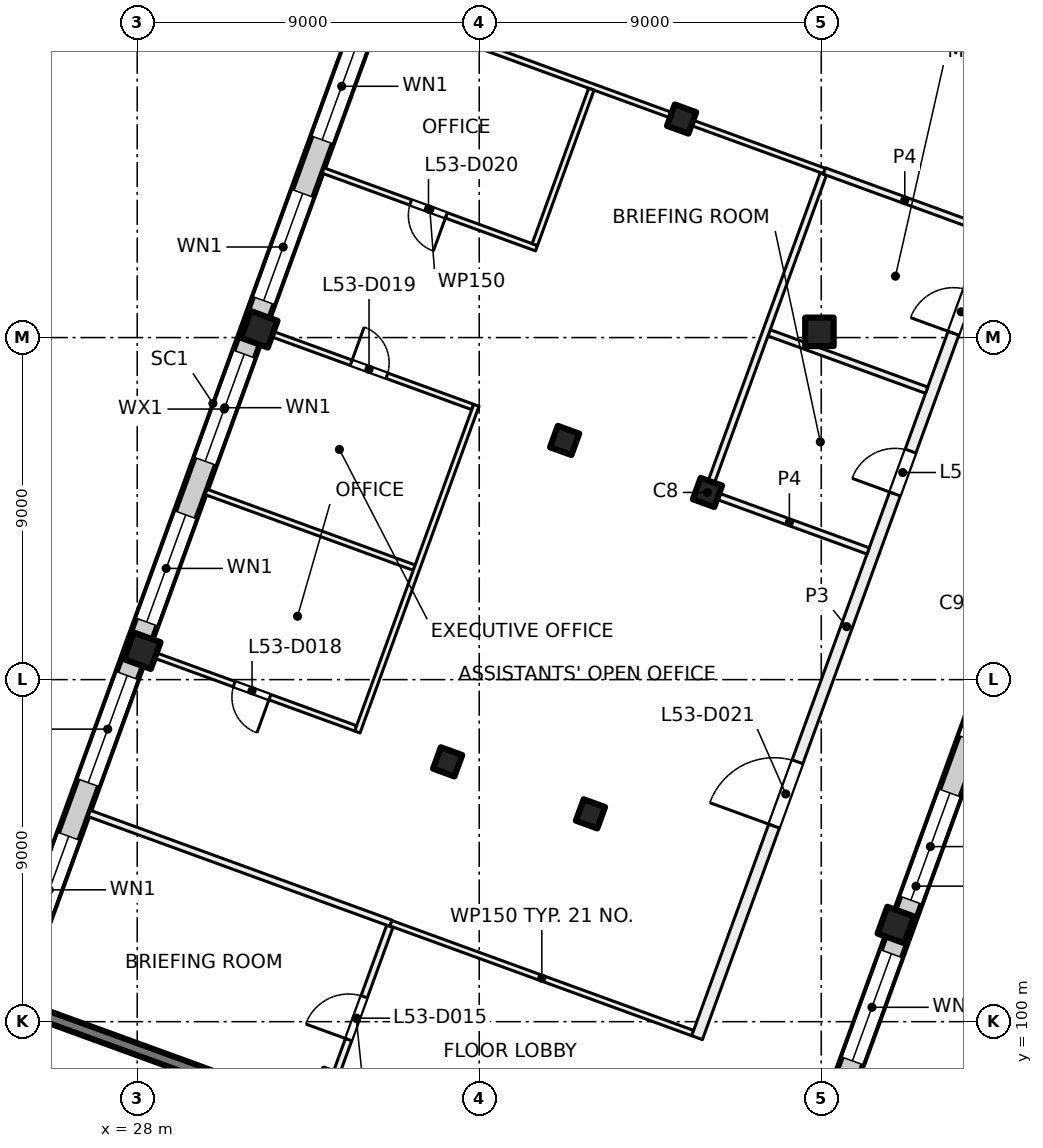
"""IFC4 building model, lengths in metres.
Left out: names, types, materials, properties, quantities, classifications, styles, units other than length and angle.
Written with IfcOpenShell. Run it as: python <this file> out.ifc"""

import sys

from ifc_helpers import new_model, si_unit, direction, frame, frame_2d, origin, origin_2d, place, context, subcontext, project, spatial, rectangle, extrude, element, fill, save


model = new_model("IFC4")
c1 = context("Model", 3, precision=1e-05, world=origin(), true_north=direction((0.0, 1.0)))
c2 = subcontext(c1, "Body", "Model", "MODEL_VIEW")
j1 = project(units=[si_unit("LENGTHUNIT", "METRE"), si_unit("PLANEANGLEUNIT", "RADIAN")], contexts=[c1])
p1 = place(None, origin())
s1 = spatial("IfcSite", under=j1, at=p1, CompositionType="ELEMENT")
p2 = place(p1, origin())
s2 = spatial("IfcBuilding", under=s1, at=p2, CompositionType="ELEMENT")
p3 = place(p2, frame((0.0, 0.0, 224.0)))
s3 = spatial("IfcBuildingStorey", under=s2, at=p3, CompositionType="ELEMENT", Elevation=224.0)
p4 = place(p3, frame((45.952, 118.152, 0.0), z_axis=(0.0, 0.0, 1.0), x_axis=(1.0, 0.0, 0.0)))
e1 = element("IfcColumn", 1, at=p4, inside=s3, PredefinedType="COLUMN", context=c2, shape_type="SweptSolid", body=[
    extrude(rectangle(XDim=0.75, YDim=0.75, at=origin_2d()), origin(), (0.0, 0.0, 1.0), 4.0),
])
for number, where, z_axis, x_axis in (
    (2, (43.006, 113.925, 0.0), (0.0, 0.0, 1.0), (-0.342, -0.94, 0.0)),
    (3, (39.927, 105.468, 0.0), (0.0, 0.0, 1.0), (-0.342, -0.94, 0.0)),
    (4, (42.325, 123.751, 0.0), (0.0, 0.0, 1.0), (-0.342, -0.94, 0.0)),
    (5, (39.247, 115.293, 0.0), (0.0, 0.0, 1.0), (-0.342, -0.94, 0.0)),
    (6, (36.169, 106.836, 0.0), (0.0, 0.0, 1.0), (-0.342, -0.94, 0.0)),
):
    element("IfcColumn", number, at=place(p3, frame(where, z_axis=z_axis, x_axis=x_axis)), inside=s3, PredefinedType="COLUMN", context=c2, shape_type="SweptSolid", body=[
        extrude(rectangle(XDim=0.6, YDim=0.6, at=origin_2d()), origin(), (0.0, 0.0, 1.0), 4.0),
    ])
for number, where, z_axis, x_axis in (
    (7, (47.962, 102.544, 0.0), (0.0, 0.0, 1.0), (-0.342, -0.94, 0.0)),
    (8, (31.212, 118.218, 0.0), (0.0, 0.0, 1.0), (-0.342, -0.94, 0.0)),
    (9, (28.134, 109.76, 0.0), (0.0, 0.0, 1.0), (-0.342, -0.94, 0.0)),
):
    element("IfcColumn", number, at=place(p3, frame(where, z_axis=z_axis, x_axis=x_axis)), inside=s3, PredefinedType="COLUMN", context=c2, shape_type="SweptSolid", body=[
        extrude(rectangle(XDim=0.75, YDim=0.75, at=origin_2d()), origin(), (0.0, 0.0, 1.0), 4.0),
    ])
p5 = place(p3, frame((32.971, 97.465, 0.0), z_axis=(0.0, 0.0, 1.0), x_axis=(-0.939695066972, 0.34201342241, 0.0)))
e10 = element("IfcWall", 10, at=p5, inside=s3, PredefinedType="SHEAR", context=c2, shape_type="SweptSolid", body=[
    extrude(rectangle(XDim=8.7, YDim=0.3, at=frame_2d((4.35, 0.0))), origin(), (0.0, 0.0, 1.0), 4.0),
])
p6 = place(p3, frame((52.212, 113.783, 0.0), z_axis=(0.0, 0.0, 1.0), x_axis=(-0.34202521188, -0.939690775968, 0.0)))
e11 = element("IfcWall", 11, at=p6, inside=s3, PredefinedType="SOLIDWALL", context=c2, shape_type="SweptSolid", body=[
    extrude(rectangle(XDim=21.745, YDim=0.6, at=frame_2d((10.873, 0.0))), origin(), (0.0, 0.0, 1.0), 3.625),
])
p7 = place(p6, frame((3.765, 0.0, 0.9)))
e12 = element("IfcOpeningElement", 12, at=p7, cuts=e11, PredefinedType="OPENING", context=c2, shape_type="SweptSolid", body=[
    extrude(rectangle(XDim=3.0, YDim=2.4, at=frame_2d((1.5, 1.2))), frame((0.0, 0.31, 0.0), z_axis=(0.0, -1.0, 0.0), x_axis=(1.0, 0.0, 0.0)), (0.0, 0.0, 1.0), 0.62),
])
p8 = place(p6, frame((8.265, 0.0, 0.9)))
e13 = element("IfcOpeningElement", 13, at=p8, cuts=e11, PredefinedType="OPENING", context=c2, shape_type="SweptSolid", body=[
    extrude(rectangle(XDim=3.0, YDim=2.4, at=frame_2d((1.5, 1.2))), frame((0.0, 0.31, 0.0), z_axis=(0.0, -1.0, 0.0), x_axis=(1.0, 0.0, 0.0)), (0.0, 0.0, 1.0), 0.62),
])
p9 = place(p6, frame((12.765, 0.0, 0.9)))
e14 = element("IfcOpeningElement", 14, at=p9, cuts=e11, PredefinedType="OPENING", context=c2, shape_type="SweptSolid", body=[
    extrude(rectangle(XDim=3.0, YDim=2.4, at=frame_2d((1.5, 1.2))), frame((0.0, 0.31, 0.0), z_axis=(0.0, -1.0, 0.0), x_axis=(1.0, 0.0, 0.0)), (0.0, 0.0, 1.0), 0.62),
])
p10 = place(p6, frame((17.265, 0.0, 0.9)))
e15 = element("IfcOpeningElement", 15, at=p10, cuts=e11, PredefinedType="OPENING", context=c2, shape_type="SweptSolid", body=[
    extrude(rectangle(XDim=3.0, YDim=2.4, at=frame_2d((1.5, 1.2))), frame((0.0, 0.31, 0.0), z_axis=(0.0, -1.0, 0.0), x_axis=(1.0, 0.0, 0.0)), (0.0, 0.0, 1.0), 0.62),
])
p11 = place(p3, frame((24.666, 100.669, 0.0), z_axis=(0.0, 0.0, 1.0), x_axis=(0.34201964167, 0.939692803373, 0.0)))
e16 = element("IfcWall", 16, at=p11, inside=s3, PredefinedType="SOLIDWALL", context=c2, shape_type="SweptSolid", body=[
    extrude(rectangle(XDim=32.884, YDim=0.6, at=frame_2d((16.442, 0.0))), origin(), (0.0, 0.0, 1.0), 3.625),
])
p12 = place(p11, frame((1.48, 0.0, 0.9)))
e17 = element("IfcOpeningElement", 17, at=p12, cuts=e16, PredefinedType="OPENING", context=c2, shape_type="SweptSolid", body=[
    extrude(rectangle(XDim=3.0, YDim=2.4, at=frame_2d((1.5, 1.2))), frame((0.0, 0.31, 0.0), z_axis=(0.0, -1.0, 0.0), x_axis=(1.0, 0.0, 0.0)), (0.0, 0.0, 1.0), 0.62),
])
p13 = place(p11, frame((5.98, 0.0, 0.9)))
e18 = element("IfcOpeningElement", 18, at=p13, cuts=e16, PredefinedType="OPENING", context=c2, shape_type="SweptSolid", body=[
    extrude(rectangle(XDim=3.0, YDim=2.4, at=frame_2d((1.5, 1.2))), frame((0.0, 0.31, 0.0), z_axis=(0.0, -1.0, 0.0), x_axis=(1.0, 0.0, 0.0)), (0.0, 0.0, 1.0), 0.62),
])
p14 = place(p11, frame((10.48, 0.0, 0.9)))
e19 = element("IfcOpeningElement", 19, at=p14, cuts=e16, PredefinedType="OPENING", context=c2, shape_type="SweptSolid", body=[
    extrude(rectangle(XDim=3.0, YDim=2.4, at=frame_2d((1.5, 1.2))), frame((0.0, 0.31, 0.0), z_axis=(0.0, -1.0, 0.0), x_axis=(1.0, 0.0, 0.0)), (0.0, 0.0, 1.0), 0.62),
])
p15 = place(p11, frame((14.98, 0.0, 0.9)))
e20 = element("IfcOpeningElement", 20, at=p15, cuts=e16, PredefinedType="OPENING", context=c2, shape_type="SweptSolid", body=[
    extrude(rectangle(XDim=3.0, YDim=2.4, at=frame_2d((1.5, 1.2))), frame((0.0, 0.31, 0.0), z_axis=(0.0, -1.0, 0.0), x_axis=(1.0, 0.0, 0.0)), (0.0, 0.0, 1.0), 0.62),
])
p16 = place(p11, frame((19.48, 0.0, 0.9)))
e21 = element("IfcOpeningElement", 21, at=p16, cuts=e16, PredefinedType="OPENING", context=c2, shape_type="SweptSolid", body=[
    extrude(rectangle(XDim=3.0, YDim=2.4, at=frame_2d((1.5, 1.2))), frame((0.0, 0.31, 0.0), z_axis=(0.0, -1.0, 0.0), x_axis=(1.0, 0.0, 0.0)), (0.0, 0.0, 1.0), 0.62),
])
p17 = place(p11, frame((23.98, 0.0, 0.9)))
e22 = element("IfcOpeningElement", 22, at=p17, cuts=e16, PredefinedType="OPENING", context=c2, shape_type="SweptSolid", body=[
    extrude(rectangle(XDim=3.0, YDim=2.4, at=frame_2d((1.5, 1.2))), frame((0.0, 0.31, 0.0), z_axis=(0.0, -1.0, 0.0), x_axis=(1.0, 0.0, 0.0)), (0.0, 0.0, 1.0), 0.62),
])
p18 = place(p11, frame((28.48, 0.0, 0.9)))
e23 = element("IfcOpeningElement", 23, at=p18, cuts=e16, PredefinedType="OPENING", context=c2, shape_type="SweptSolid", body=[
    extrude(rectangle(XDim=3.0, YDim=2.4, at=frame_2d((1.5, 1.2))), frame((0.0, 0.31, 0.0), z_axis=(0.0, -1.0, 0.0), x_axis=(1.0, 0.0, 0.0)), (0.0, 0.0, 1.0), 0.62),
])
p19 = place(p3, frame((26.736, 105.48, 0.0), z_axis=(0.0, 0.0, 1.0), x_axis=(0.939706509432, -0.341981982173, 0.0)))
e24 = element("IfcWall", 24, at=p19, inside=s3, PredefinedType="PARTITIONING", context=c2, shape_type="SweptSolid", body=[
    extrude(rectangle(XDim=8.45, YDim=0.175, at=frame_2d((4.225, 0.0))), origin(), (0.0, 0.0, 1.0), 3.625),
])
p20 = place(p3, frame((29.814, 113.938, 0.0), z_axis=(0.0, 0.0, 1.0), x_axis=(0.939738354986, -0.341894463495, 0.0)))
e25 = element("IfcWall", 25, at=p20, inside=s3, PredefinedType="PARTITIONING", context=c2, shape_type="SweptSolid", body=[
    extrude(rectangle(XDim=5.826, YDim=0.15, at=frame_2d((2.913, 0.0))), origin(), (0.0, 0.0, 1.0), 3.625),
])
p21 = place(p3, frame((31.353, 118.166, 0.0), z_axis=(0.0, 0.0, 1.0), x_axis=(0.939733456466, -0.341907927371, 0.0)))
e26 = element("IfcWall", 26, at=p21, inside=s3, PredefinedType="PARTITIONING", context=c2, shape_type="SweptSolid", body=[
    extrude(rectangle(XDim=5.826, YDim=0.15, at=frame_2d((2.913, 0.0))), origin(), (0.0, 0.0, 1.0), 3.625),
])
p22 = place(p21, frame((2.423, 0.0, 0.0)))
e27 = element("IfcOpeningElement", 27, at=p22, cuts=e26, PredefinedType="OPENING", context=c2, shape_type="SweptSolid", body=[
    extrude(rectangle(XDim=1.0, YDim=2.1, at=frame_2d((0.5, 1.05))), frame((0.0, 0.085, 0.0), z_axis=(0.0, -1.0, 0.0), x_axis=(1.0, 0.0, 0.0)), (0.0, 0.0, 1.0), 0.17),
])
p23 = place(p3, frame((33.749, 107.717, 0.0), z_axis=(0.0, 0.0, 1.0), x_axis=(-0.939718757431, 0.341948324943, 0.0)))
e28 = element("IfcWall", 28, at=p23, inside=s3, PredefinedType="PARTITIONING", context=c2, shape_type="SweptSolid", body=[
    extrude(rectangle(XDim=5.825, YDim=0.15, at=frame_2d((2.913, 0.0))), origin(), (0.0, 0.0, 1.0), 3.625),
])
p24 = place(p23, frame((2.403, 0.0, 0.0)))
e29 = element("IfcOpeningElement", 29, at=p24, cuts=e28, PredefinedType="OPENING", context=c2, shape_type="SweptSolid", body=[
    extrude(rectangle(XDim=1.0, YDim=2.1, at=frame_2d((0.5, 1.05))), frame((0.0, 0.085, 0.0), z_axis=(0.0, -1.0, 0.0), x_axis=(1.0, 0.0, 0.0)), (0.0, 0.0, 1.0), 0.17),
])
p25 = place(p3, frame((36.924, 116.218, 0.0), z_axis=(0.0, 0.0, 1.0), x_axis=(-0.342220796767, -0.939619564643, 0.0)))
e30 = element("IfcWall", 30, at=p25, inside=s3, PredefinedType="PARTITIONING", context=c2, shape_type="SweptSolid", body=[
    extrude(rectangle(XDim=9.149, YDim=0.15, at=frame_2d((4.575, 0.0))), origin(), (0.0, 0.0, 1.0), 3.625),
])
p26 = place(p3, frame((34.431, 126.624, 0.0), z_axis=(0.0, 0.0, 1.0), x_axis=(0.939703144457, -0.341991228392, 0.0)))
e31 = element("IfcWall", 31, at=p26, inside=s3, PredefinedType="PARTITIONING", context=c2, shape_type="SweptSolid", body=[
    extrude(rectangle(XDim=12.401, YDim=0.15, at=frame_2d((6.2, 0.0))), origin(), (0.0, 0.0, 1.0), 3.625),
])
p27 = place(p3, frame((32.881, 97.657, 0.0), z_axis=(0.0, 0.0, 1.0), x_axis=(0.342058204353, 0.939678766832, 0.0)))
e32 = element("IfcWall", 32, at=p27, inside=s3, PredefinedType="PARTITIONING", context=c2, shape_type="SweptSolid", body=[
    extrude(rectangle(XDim=5.163, YDim=0.175, at=frame_2d((2.581, 0.0))), origin(), (0.0, 0.0, 1.0), 3.625),
])
p28 = place(p27, frame((1.991, 0.0, 0.0)))
e33 = element("IfcOpeningElement", 33, at=p28, cuts=e32, PredefinedType="OPENING", context=c2, shape_type="SweptSolid", body=[
    extrude(rectangle(XDim=1.2, YDim=2.1, at=frame_2d((0.6, 1.05))), frame((0.0, 0.097, 0.0), z_axis=(0.0, -1.0, 0.0), x_axis=(1.0, 0.0, 0.0)), (0.0, 0.0, 1.0), 0.195),
])
p29 = place(p3, frame((34.677, 102.59, 0.0), z_axis=(0.0, 0.0, 1.0), x_axis=(0.939683705252, -0.342044637561, 0.0)))
e34 = element("IfcWall", 34, at=p29, inside=s3, PredefinedType="PARTITIONING", context=c2, shape_type="SweptSolid", body=[
    extrude(rectangle(XDim=8.45, YDim=0.15, at=frame_2d((4.225, 0.0))), origin(), (0.0, 0.0, 1.0), 3.625),
])
p30 = place(p3, frame((38.507, 120.351, 0.0), z_axis=(0.0, 0.0, 1.0), x_axis=(-0.939678850769, 0.342057973766, 0.0)))
e35 = element("IfcWall", 35, at=p30, inside=s3, PredefinedType="PARTITIONING", context=c2, shape_type="SweptSolid", body=[
    extrude(rectangle(XDim=5.975, YDim=0.15, at=frame_2d((2.988, 0.0))), origin(), (0.0, 0.0, 1.0), 3.625),
])
p31 = place(p30, frame((2.525, 0.0, 0.0)))
e36 = element("IfcOpeningElement", 36, at=p31, cuts=e35, PredefinedType="OPENING", context=c2, shape_type="SweptSolid", body=[
    extrude(rectangle(XDim=1.0, YDim=2.1, at=frame_2d((0.5, 1.05))), frame((0.0, 0.085, 0.0), z_axis=(0.0, -1.0, 0.0), x_axis=(1.0, 0.0, 0.0)), (0.0, 0.0, 1.0), 0.17),
])
p32 = place(p3, frame((39.95, 124.536, 0.0), z_axis=(0.0, 0.0, 1.0), x_axis=(-0.341783611499, -0.939778677621, 0.0)))
e37 = element("IfcWall", 37, at=p32, inside=s3, PredefinedType="PARTITIONING", context=c2, shape_type="SweptSolid", body=[
    extrude(rectangle(XDim=4.351, YDim=0.15, at=frame_2d((2.175, 0.0))), origin(), (0.0, 0.0, 1.0), 3.625),
])
p33 = place(p3, frame((42.732, 99.579, 0.0), z_axis=(0.0, 0.0, 1.0), x_axis=(0.342036000593, 0.939686849061, 0.0)))
e38 = element("IfcWall", 38, at=p33, inside=s3, PredefinedType="PARTITIONING", context=c2, shape_type="SweptSolid", body=[
    extrude(rectangle(XDim=23.018, YDim=0.3, at=frame_2d((11.509, 0.0))), origin(), (0.0, 0.0, 1.0), 3.625),
])
p34 = place(p33, frame((15.225, 0.0, 0.0)))
e39 = element("IfcOpeningElement", 39, at=p34, cuts=e38, PredefinedType="OPENING", context=c2, shape_type="SweptSolid", body=[
    extrude(rectangle(XDim=1.2, YDim=2.1, at=frame_2d((0.6, 1.05))), frame((0.0, 0.16, 0.0), z_axis=(0.0, -1.0, 0.0), x_axis=(1.0, 0.0, 0.0)), (0.0, 0.0, 1.0), 0.32),
])
p35 = place(p33, frame((19.725, 0.0, 0.0)))
e40 = element("IfcOpeningElement", 40, at=p35, cuts=e38, PredefinedType="OPENING", context=c2, shape_type="SweptSolid", body=[
    extrude(rectangle(XDim=1.2, YDim=2.1, at=frame_2d((0.6, 1.05))), frame((0.0, 0.16, 0.0), z_axis=(0.0, -1.0, 0.0), x_axis=(1.0, 0.0, 0.0)), (0.0, 0.0, 1.0), 0.32),
])
p36 = place(p33, frame((5.925, 0.0, 0.0)))
e41 = element("IfcOpeningElement", 41, at=p36, cuts=e38, PredefinedType="OPENING", context=c2, shape_type="SweptSolid", body=[
    extrude(rectangle(XDim=1.8, YDim=2.1, at=frame_2d((0.9, 1.05))), frame((0.0, 0.16, 0.0), z_axis=(0.0, -1.0, 0.0), x_axis=(1.0, 0.0, 0.0)), (0.0, 0.0, 1.0), 0.32),
])
for number, where, z_axis, x_axis in (
    (42, (43.088, 113.895, 0.0), (0.0, 0.0, 1.0), (0.94, -0.342, 0.0)),
    (43, (44.627, 118.124, 0.0), (0.0, 0.0, 1.0), (0.94, -0.342, 0.0)),
):
    element("IfcWall", number, at=place(p3, frame(where, z_axis=z_axis, x_axis=x_axis)), inside=s3, PredefinedType="PARTITIONING", context=c2, shape_type="SweptSolid", body=[
        extrude(rectangle(XDim=4.412, YDim=0.175, at=frame_2d((2.206, 0.0))), origin(), (0.0, 0.0, 1.0), 3.625),
    ])
p37 = place(p3, frame((46.054, 122.301, 0.0), z_axis=(0.0, 0.0, 1.0), x_axis=(-0.341963022424, -0.939713409128, 0.0)))
e44 = element("IfcWall", 44, at=p37, inside=s3, PredefinedType="PARTITIONING", context=c2, shape_type="SweptSolid", body=[
    extrude(rectangle(XDim=9.001, YDim=0.175, at=frame_2d((4.5, 0.0))), origin(), (0.0, 0.0, 1.0), 3.625),
])
p38 = place(p3, frame((50.312, 120.843, 0.0), z_axis=(0.0, 0.0, 1.0), x_axis=(-0.939609529273, 0.342248349154, 0.0)))
e45 = element("IfcWall", 45, at=p38, inside=s3, PredefinedType="PARTITIONING", context=c2, shape_type="SweptSolid", body=[
    extrude(rectangle(XDim=4.5, YDim=0.175, at=frame_2d((2.25, 0.0))), origin(), (0.0, 0.0, 1.0), 3.625),
])
p39 = place(p8, origin())
e46 = element("IfcWindow", 46, at=p39, inside=s3, PartitioningType="SINGLE_PANEL", PredefinedType="WINDOW", context=c2, shape_type="SweptSolid", body=[
    extrude(rectangle(XDim=3.0, YDim=2.4, at=frame_2d((1.5, 1.2))), frame((0.0, 0.03, 0.0), z_axis=(0.0, -1.0, 0.0), x_axis=(1.0, 0.0, 0.0)), (0.0, 0.0, 1.0), 0.06),
])
fill(e13, e46)
p40 = place(p9, origin())
e47 = element("IfcWindow", 47, at=p40, inside=s3, PartitioningType="SINGLE_PANEL", PredefinedType="WINDOW", context=c2, shape_type="SweptSolid", body=[
    extrude(rectangle(XDim=3.0, YDim=2.4, at=frame_2d((1.5, 1.2))), frame((0.0, 0.03, 0.0), z_axis=(0.0, -1.0, 0.0), x_axis=(1.0, 0.0, 0.0)), (0.0, 0.0, 1.0), 0.06),
])
fill(e14, e47)
p41 = place(p12, origin())
e48 = element("IfcWindow", 48, at=p41, inside=s3, PartitioningType="SINGLE_PANEL", PredefinedType="WINDOW", context=c2, shape_type="SweptSolid", body=[
    extrude(rectangle(XDim=3.0, YDim=2.4, at=frame_2d((1.5, 1.2))), frame((0.0, 0.03, 0.0), z_axis=(0.0, -1.0, 0.0), x_axis=(1.0, 0.0, 0.0)), (0.0, 0.0, 1.0), 0.06),
])
fill(e17, e48)
p42 = place(p13, origin())
e49 = element("IfcWindow", 49, at=p42, inside=s3, PartitioningType="SINGLE_PANEL", PredefinedType="WINDOW", context=c2, shape_type="SweptSolid", body=[
    extrude(rectangle(XDim=3.0, YDim=2.4, at=frame_2d((1.5, 1.2))), frame((0.0, 0.03, 0.0), z_axis=(0.0, -1.0, 0.0), x_axis=(1.0, 0.0, 0.0)), (0.0, 0.0, 1.0), 0.06),
])
fill(e18, e49)
p43 = place(p14, origin())
e50 = element("IfcWindow", 50, at=p43, inside=s3, PartitioningType="SINGLE_PANEL", PredefinedType="WINDOW", context=c2, shape_type="SweptSolid", body=[
    extrude(rectangle(XDim=3.0, YDim=2.4, at=frame_2d((1.5, 1.2))), frame((0.0, 0.03, 0.0), z_axis=(0.0, -1.0, 0.0), x_axis=(1.0, 0.0, 0.0)), (0.0, 0.0, 1.0), 0.06),
])
fill(e19, e50)
p44 = place(p15, origin())
e51 = element("IfcWindow", 51, at=p44, inside=s3, PartitioningType="SINGLE_PANEL", PredefinedType="WINDOW", context=c2, shape_type="SweptSolid", body=[
    extrude(rectangle(XDim=3.0, YDim=2.4, at=frame_2d((1.5, 1.2))), frame((0.0, 0.03, 0.0), z_axis=(0.0, -1.0, 0.0), x_axis=(1.0, 0.0, 0.0)), (0.0, 0.0, 1.0), 0.06),
])
fill(e20, e51)
p45 = place(p16, origin())
e52 = element("IfcWindow", 52, at=p45, inside=s3, PartitioningType="SINGLE_PANEL", PredefinedType="WINDOW", context=c2, shape_type="SweptSolid", body=[
    extrude(rectangle(XDim=3.0, YDim=2.4, at=frame_2d((1.5, 1.2))), frame((0.0, 0.03, 0.0), z_axis=(0.0, -1.0, 0.0), x_axis=(1.0, 0.0, 0.0)), (0.0, 0.0, 1.0), 0.06),
])
fill(e21, e52)
p46 = place(p17, origin())
e53 = element("IfcWindow", 53, at=p46, inside=s3, PartitioningType="SINGLE_PANEL", PredefinedType="WINDOW", context=c2, shape_type="SweptSolid", body=[
    extrude(rectangle(XDim=3.0, YDim=2.4, at=frame_2d((1.5, 1.2))), frame((0.0, 0.03, 0.0), z_axis=(0.0, -1.0, 0.0), x_axis=(1.0, 0.0, 0.0)), (0.0, 0.0, 1.0), 0.06),
])
fill(e22, e53)
p47 = place(p28, origin())
e54 = element("IfcDoor", 54, at=p47, inside=s3, OperationType="DOUBLE_DOOR_SINGLE_SWING", PredefinedType="DOOR", context=c2, shape_type="SweptSolid", body=[
    extrude(rectangle(XDim=1.2, YDim=2.1, at=frame_2d((0.6, 1.05))), frame((0.0, 0.025, 0.0), z_axis=(0.0, -1.0, 0.0), x_axis=(1.0, 0.0, 0.0)), (0.0, 0.0, 1.0), 0.05),
])
fill(e33, e54)
p48 = place(p34, origin())
e55 = element("IfcDoor", 55, at=p48, inside=s3, OperationType="DOUBLE_DOOR_SINGLE_SWING", PredefinedType="DOOR", context=c2, shape_type="SweptSolid", body=[
    extrude(rectangle(XDim=1.2, YDim=2.1, at=frame_2d((0.6, 1.05))), frame((0.0, 0.025, 0.0), z_axis=(0.0, -1.0, 0.0), x_axis=(1.0, 0.0, 0.0)), (0.0, 0.0, 1.0), 0.05),
])
fill(e39, e55)
p49 = place(p35, origin())
e56 = element("IfcDoor", 56, at=p49, inside=s3, OperationType="DOUBLE_DOOR_SINGLE_SWING", PredefinedType="DOOR", context=c2, shape_type="SweptSolid", body=[
    extrude(rectangle(XDim=1.2, YDim=2.1, at=frame_2d((0.6, 1.05))), frame((0.0, 0.025, 0.0), z_axis=(0.0, -1.0, 0.0), x_axis=(1.0, 0.0, 0.0)), (0.0, 0.0, 1.0), 0.05),
])
fill(e40, e56)
p50 = place(p24, origin())
e57 = element("IfcDoor", 57, at=p50, inside=s3, OperationType="SINGLE_SWING_LEFT", PredefinedType="DOOR", context=c2, shape_type="SweptSolid", body=[
    extrude(rectangle(XDim=1.0, YDim=2.1, at=frame_2d((0.5, 1.05))), frame((0.0, 0.025, 0.0), z_axis=(0.0, -1.0, 0.0), x_axis=(1.0, 0.0, 0.0)), (0.0, 0.0, 1.0), 0.05),
])
fill(e29, e57)
p51 = place(p22, origin())
e58 = element("IfcDoor", 58, at=p51, inside=s3, OperationType="SINGLE_SWING_LEFT", PredefinedType="DOOR", context=c2, shape_type="SweptSolid", body=[
    extrude(rectangle(XDim=1.0, YDim=2.1, at=frame_2d((0.5, 1.05))), frame((0.0, 0.025, 0.0), z_axis=(0.0, -1.0, 0.0), x_axis=(1.0, 0.0, 0.0)), (0.0, 0.0, 1.0), 0.05),
])
fill(e27, e58)
p52 = place(p31, origin())
e59 = element("IfcDoor", 59, at=p52, inside=s3, OperationType="SINGLE_SWING_LEFT", PredefinedType="DOOR", context=c2, shape_type="SweptSolid", body=[
    extrude(rectangle(XDim=1.0, YDim=2.1, at=frame_2d((0.5, 1.05))), frame((0.0, 0.025, 0.0), z_axis=(0.0, -1.0, 0.0), x_axis=(1.0, 0.0, 0.0)), (0.0, 0.0, 1.0), 0.05),
])
fill(e36, e59)
p53 = place(p36, origin())
e60 = element("IfcDoor", 60, at=p53, inside=s3, OperationType="DOUBLE_DOOR_SINGLE_SWING", PredefinedType="DOOR", context=c2, shape_type="SweptSolid", body=[
    extrude(rectangle(XDim=1.8, YDim=2.1, at=frame_2d((0.9, 1.05))), frame((0.0, 0.025, 0.0), z_axis=(0.0, -1.0, 0.0), x_axis=(1.0, 0.0, 0.0)), (0.0, 0.0, 1.0), 0.05),
])
fill(e41, e60)
save(model, sys.argv[1])
